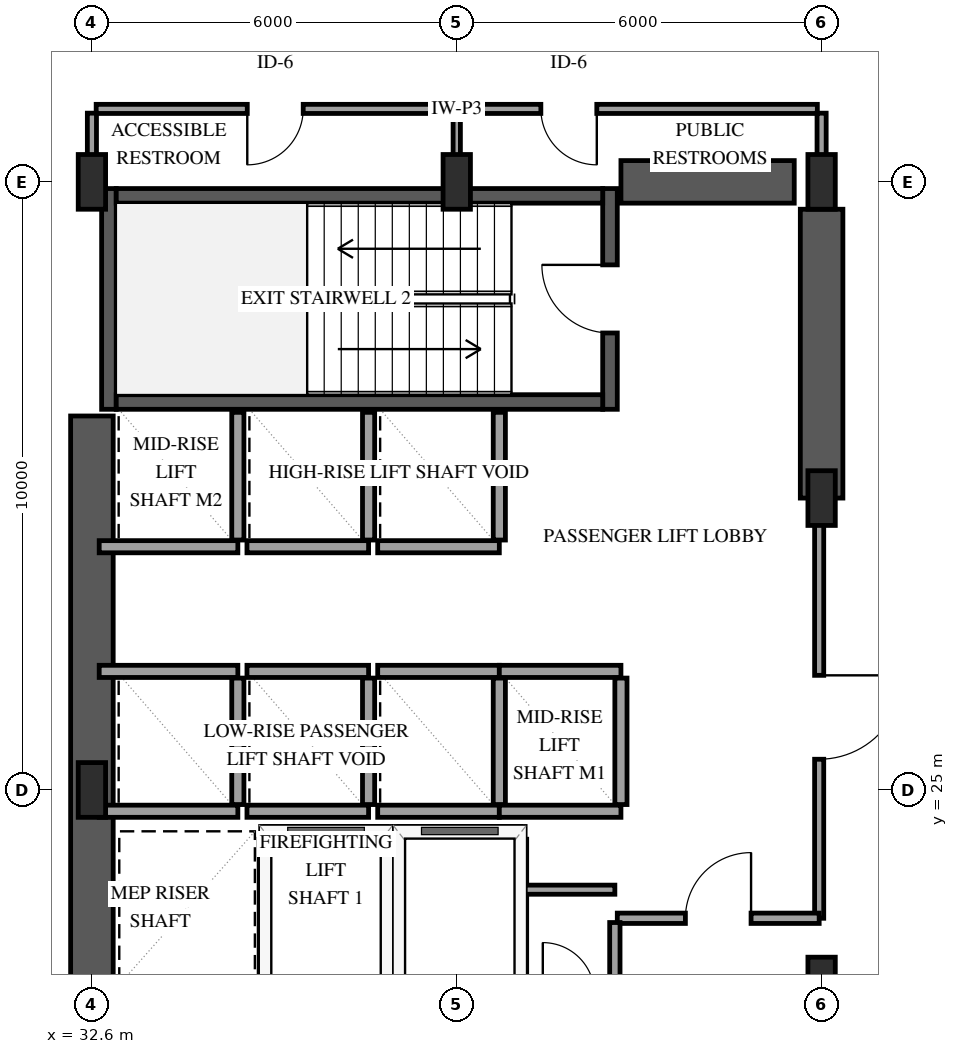
"""IFC4 building model, lengths in metres.
Left out: names, types, materials, properties, quantities, classifications, styles, units other than length and angle.
Written with IfcOpenShell. Run it as: python <this file> out.ifc"""

import sys

from ifc_helpers import new_model, si_unit, direction, frame, frame_2d, origin, origin_2d, place, context, subcontext, project, spatial, rectangle, extrude, element, fill, save


model = new_model("IFC4")
c1 = context("Model", 3, precision=1e-05, world=origin(), true_north=direction((0.0, 1.0)))
c2 = subcontext(c1, "Body", "Model", "MODEL_VIEW")
j1 = project(units=[si_unit("LENGTHUNIT", "METRE"), si_unit("PLANEANGLEUNIT", "RADIAN")], contexts=[c1])
p1 = place(None, origin())
s1 = spatial("IfcSite", under=j1, at=p1, CompositionType="ELEMENT")
p2 = place(p1, origin())
s2 = spatial("IfcBuilding", under=s1, at=p2, CompositionType="ELEMENT")
p3 = place(p2, frame((0.0, 0.0, 20.7)))
s3 = spatial("IfcBuildingStorey", under=s2, at=p3, CompositionType="ELEMENT", Elevation=20.7)
p4 = place(p3, frame((32.88, 31.26, 0.0), z_axis=(0.0, 0.0, 1.0), x_axis=(0.0, 1.0, 0.0)))
e1 = element("IfcWall", 1, at=p4, inside=s3, PredefinedType="SHEAR", context=c2, shape_type="SweptSolid", body=[
    extrude(rectangle(XDim=3.63, YDim=0.24, at=frame_2d((1.815, 0.0))), origin(), (0.0, 0.0, 1.0), 4.5),
])
p5 = place(p3, frame((41.12, 31.26, 0.0), z_axis=(0.0, 0.0, 1.0), x_axis=(0.0, 1.0, 0.0)))
e2 = element("IfcWall", 2, at=p5, inside=s3, PredefinedType="SHEAR", context=c2, shape_type="SweptSolid", body=[
    extrude(rectangle(XDim=3.63, YDim=0.24, at=frame_2d((1.815, 0.0))), origin(), (0.0, 0.0, 1.0), 4.5),
])
p6 = place(p5, frame((1.255, 0.0, 0.0)))
e3 = element("IfcOpeningElement", 3, at=p6, cuts=e2, PredefinedType="OPENING", context=c2, shape_type="SweptSolid", body=[
    extrude(rectangle(XDim=1.12, YDim=2.15, at=frame_2d((0.56, 1.075))), frame((0.0, 0.13, 0.0), z_axis=(0.0, -1.0, 0.0), x_axis=(1.0, 0.0, 0.0)), (0.0, 0.0, 1.0), 0.26),
])
for number, where, z_axis, x_axis in (
    (4, (33.0, 31.38, 0.0), (0.0, 0.0, 1.0), (1.0, 0.0, 0.0)),
    (5, (33.0, 34.77, 0.0), (0.0, 0.0, 1.0), (1.0, 0.0, 0.0)),
):
    element("IfcWall", number, at=place(p3, frame(where, z_axis=z_axis, x_axis=x_axis)), inside=s3, PredefinedType="SHEAR", context=c2, shape_type="SweptSolid", body=[
        extrude(rectangle(XDim=8.0, YDim=0.24, at=frame_2d((4.0, 0.0))), origin(), (0.0, 0.0, 1.0), 4.5),
    ])
p7 = place(p3, frame((32.6, 18.85, 0.0), z_axis=(0.0, 0.0, 1.0), x_axis=(0.0, 1.0, 0.0)))
e6 = element("IfcWall", 6, at=p7, inside=s3, PredefinedType="SHEAR", context=c2, shape_type="SweptSolid", body=[
    extrude(rectangle(XDim=12.3, YDim=0.7, at=frame_2d((6.15, 0.0))), origin(), (0.0, 0.0, 1.0), 4.5),
])
p8 = place(p3, frame((41.3, 35.0, 0.0), z_axis=(0.0, 0.0, 1.0), x_axis=(1.0, 0.0, 0.0)))
e7 = element("IfcWall", 7, at=p8, inside=s3, PredefinedType="SHEAR", context=c2, shape_type="SweptSolid", body=[
    extrude(rectangle(XDim=2.85, YDim=0.7, at=frame_2d((1.425, 0.0))), origin(), (0.0, 0.0, 1.0), 4.5),
])
p9 = place(p3, frame((44.6, 29.8, 0.0), z_axis=(0.0, 0.0, 1.0), x_axis=(0.0, 1.0, 0.0)))
e8 = element("IfcWall", 8, at=p9, inside=s3, PredefinedType="SHEAR", context=c2, shape_type="SweptSolid", body=[
    extrude(rectangle(XDim=4.75, YDim=0.7, at=frame_2d((2.375, 0.0))), origin(), (0.0, 0.0, 1.0), 4.5),
])
for number, where, z_axis, x_axis in (
    (9, (32.6, 25.0, 0.0), (0.0, 0.0, 1.0), (1.0, 0.0, 0.0)),
    (10, (32.6, 35.0, 0.0), (0.0, 0.0, 1.0), (1.0, 0.0, 0.0)),
    (11, (38.6, 35.0, 0.0), (0.0, 0.0, 1.0), (1.0, 0.0, 0.0)),
    (12, (44.6, 21.8, 0.0), (0.0, 0.0, 1.0), (1.0, 0.0, 0.0)),
    (13, (44.6, 29.8, 0.0), (0.0, 0.0, 1.0), (1.0, 0.0, 0.0)),
    (14, (44.6, 35.0, 0.0), (0.0, 0.0, 1.0), (1.0, 0.0, 0.0)),
):
    element("IfcColumn", number, at=place(p3, frame(where, z_axis=z_axis, x_axis=x_axis)), inside=s3, PredefinedType="PILASTER", context=c2, shape_type="SweptSolid", body=[
        extrude(rectangle(XDim=0.45, YDim=0.9, at=origin_2d()), origin(), (0.0, 0.0, 1.0), 4.5),
    ])
p10 = place(p3, frame((35.45, 24.3, 0.0), z_axis=(0.0, 0.0, 1.0), x_axis=(1.0, 0.0, 0.0)))
e15 = element("IfcWall", 15, at=p10, inside=s3, PredefinedType="SOLIDWALL", context=c2, shape_type="SweptSolid", body=[
    extrude(rectangle(XDim=2.0, YDim=0.2, at=frame_2d((1.0, 0.0))), origin(), (0.0, 0.0, 1.0), 4.18),
])
for number, where, z_axis, x_axis in (
    (16, (35.45, 21.81, 0.0), (0.0, 0.0, 1.0), (0.0, 1.0, 0.0)),
    (17, (37.45, 21.81, 0.0), (0.0, 0.0, 1.0), (0.0, 1.0, 0.0)),
):
    element("IfcWall", number, at=place(p3, frame(where, z_axis=z_axis, x_axis=x_axis)), inside=s3, PredefinedType="SOLIDWALL", context=c2, shape_type="SweptSolid", body=[
        extrude(rectangle(XDim=2.38, YDim=0.2, at=frame_2d((1.19, 0.0))), origin(), (0.0, 0.0, 1.0), 4.18),
    ])
p11 = place(p3, frame((37.65, 24.3, 0.0), z_axis=(0.0, 0.0, 1.0), x_axis=(1.0, 0.0, 0.0)))
e18 = element("IfcWall", 18, at=p11, inside=s3, PredefinedType="SOLIDWALL", context=c2, shape_type="SweptSolid", body=[
    extrude(rectangle(XDim=2.0, YDim=0.2, at=frame_2d((1.0, 0.0))), origin(), (0.0, 0.0, 1.0), 4.18),
])
p12 = place(p3, frame((39.65, 21.81, 0.0), z_axis=(0.0, 0.0, 1.0), x_axis=(0.0, 1.0, 0.0)))
e19 = element("IfcWall", 19, at=p12, inside=s3, PredefinedType="SOLIDWALL", context=c2, shape_type="SweptSolid", body=[
    extrude(rectangle(XDim=2.38, YDim=0.2, at=frame_2d((1.19, 0.0))), origin(), (0.0, 0.0, 1.0), 4.18),
])
for number, where, z_axis, x_axis in (
    (20, (32.72, 24.65, 0.0), (0.0, 0.0, 1.0), (1.0, 0.0, 0.0)),
    (21, (32.72, 26.95, 0.0), (0.0, 0.0, 1.0), (1.0, 0.0, 0.0)),
):
    element("IfcWall", number, at=place(p3, frame(where, z_axis=z_axis, x_axis=x_axis)), inside=s3, PredefinedType="SOLIDWALL", context=c2, shape_type="SweptSolid", body=[
        extrude(rectangle(XDim=2.28, YDim=0.2, at=frame_2d((1.14, 0.0))), origin(), (0.0, 0.0, 1.0), 4.18),
    ])
p13 = place(p3, frame((35.0, 24.76, 0.0), z_axis=(0.0, 0.0, 1.0), x_axis=(0.0, 1.0, 0.0)))
e22 = element("IfcWall", 22, at=p13, inside=s3, PredefinedType="SOLIDWALL", context=c2, shape_type="SweptSolid", body=[
    extrude(rectangle(XDim=2.08, YDim=0.2, at=frame_2d((1.04, 0.0))), origin(), (0.0, 0.0, 1.0), 4.18),
])
for number, where, z_axis, x_axis in (
    (23, (35.15, 24.65, 0.0), (0.0, 0.0, 1.0), (1.0, 0.0, 0.0)),
    (24, (35.15, 26.95, 0.0), (0.0, 0.0, 1.0), (1.0, 0.0, 0.0)),
):
    element("IfcWall", number, at=place(p3, frame(where, z_axis=z_axis, x_axis=x_axis)), inside=s3, PredefinedType="SOLIDWALL", context=c2, shape_type="SweptSolid", body=[
        extrude(rectangle(XDim=2.0, YDim=0.2, at=frame_2d((1.0, 0.0))), origin(), (0.0, 0.0, 1.0), 4.18),
    ])
p14 = place(p3, frame((37.15, 24.76, 0.0), z_axis=(0.0, 0.0, 1.0), x_axis=(0.0, 1.0, 0.0)))
e25 = element("IfcWall", 25, at=p14, inside=s3, PredefinedType="SOLIDWALL", context=c2, shape_type="SweptSolid", body=[
    extrude(rectangle(XDim=2.08, YDim=0.2, at=frame_2d((1.04, 0.0))), origin(), (0.0, 0.0, 1.0), 4.18),
])
for number, where, z_axis, x_axis in (
    (26, (37.3, 24.65, 0.0), (0.0, 0.0, 1.0), (1.0, 0.0, 0.0)),
    (27, (37.3, 26.95, 0.0), (0.0, 0.0, 1.0), (1.0, 0.0, 0.0)),
):
    element("IfcWall", number, at=place(p3, frame(where, z_axis=z_axis, x_axis=x_axis)), inside=s3, PredefinedType="SOLIDWALL", context=c2, shape_type="SweptSolid", body=[
        extrude(rectangle(XDim=2.0, YDim=0.2, at=frame_2d((1.0, 0.0))), origin(), (0.0, 0.0, 1.0), 4.18),
    ])
p15 = place(p3, frame((39.3, 24.76, 0.0), z_axis=(0.0, 0.0, 1.0), x_axis=(0.0, 1.0, 0.0)))
e28 = element("IfcWall", 28, at=p15, inside=s3, PredefinedType="SOLIDWALL", context=c2, shape_type="SweptSolid", body=[
    extrude(rectangle(XDim=2.08, YDim=0.2, at=frame_2d((1.04, 0.0))), origin(), (0.0, 0.0, 1.0), 4.18),
])
for number, where, z_axis, x_axis in (
    (29, (39.3, 24.65, 0.0), (0.0, 0.0, 1.0), (1.0, 0.0, 0.0)),
    (30, (39.3, 26.95, 0.0), (0.0, 0.0, 1.0), (1.0, 0.0, 0.0)),
):
    element("IfcWall", number, at=place(p3, frame(where, z_axis=z_axis, x_axis=x_axis)), inside=s3, PredefinedType="SOLIDWALL", context=c2, shape_type="SweptSolid", body=[
        extrude(rectangle(XDim=2.0, YDim=0.2, at=frame_2d((1.0, 0.0))), origin(), (0.0, 0.0, 1.0), 4.18),
    ])
p16 = place(p3, frame((41.3, 24.76, 0.0), z_axis=(0.0, 0.0, 1.0), x_axis=(0.0, 1.0, 0.0)))
e31 = element("IfcWall", 31, at=p16, inside=s3, PredefinedType="SOLIDWALL", context=c2, shape_type="SweptSolid", body=[
    extrude(rectangle(XDim=2.08, YDim=0.2, at=frame_2d((1.04, 0.0))), origin(), (0.0, 0.0, 1.0), 4.18),
])
p17 = place(p3, frame((32.72, 29.0, 0.0), z_axis=(0.0, 0.0, 1.0), x_axis=(1.0, 0.0, 0.0)))
e32 = element("IfcWall", 32, at=p17, inside=s3, PredefinedType="SOLIDWALL", context=c2, shape_type="SweptSolid", body=[
    extrude(rectangle(XDim=2.28, YDim=0.2, at=frame_2d((1.14, 0.0))), origin(), (0.0, 0.0, 1.0), 4.18),
])
p18 = place(p3, frame((35.0, 29.11, 0.0), z_axis=(0.0, 0.0, 1.0), x_axis=(0.0, 1.0, 0.0)))
e33 = element("IfcWall", 33, at=p18, inside=s3, PredefinedType="SOLIDWALL", context=c2, shape_type="SweptSolid", body=[
    extrude(rectangle(XDim=2.1, YDim=0.2, at=frame_2d((1.05, 0.0))), origin(), (0.0, 0.0, 1.0), 4.18),
])
p19 = place(p3, frame((35.15, 29.0, 0.0), z_axis=(0.0, 0.0, 1.0), x_axis=(1.0, 0.0, 0.0)))
e34 = element("IfcWall", 34, at=p19, inside=s3, PredefinedType="SOLIDWALL", context=c2, shape_type="SweptSolid", body=[
    extrude(rectangle(XDim=2.0, YDim=0.2, at=frame_2d((1.0, 0.0))), origin(), (0.0, 0.0, 1.0), 4.18),
])
p20 = place(p3, frame((37.15, 29.11, 0.0), z_axis=(0.0, 0.0, 1.0), x_axis=(0.0, 1.0, 0.0)))
e35 = element("IfcWall", 35, at=p20, inside=s3, PredefinedType="SOLIDWALL", context=c2, shape_type="SweptSolid", body=[
    extrude(rectangle(XDim=2.1, YDim=0.2, at=frame_2d((1.05, 0.0))), origin(), (0.0, 0.0, 1.0), 4.18),
])
p21 = place(p3, frame((37.3, 29.0, 0.0), z_axis=(0.0, 0.0, 1.0), x_axis=(1.0, 0.0, 0.0)))
e36 = element("IfcWall", 36, at=p21, inside=s3, PredefinedType="SOLIDWALL", context=c2, shape_type="SweptSolid", body=[
    extrude(rectangle(XDim=2.0, YDim=0.2, at=frame_2d((1.0, 0.0))), origin(), (0.0, 0.0, 1.0), 4.18),
])
p22 = place(p3, frame((39.3, 29.11, 0.0), z_axis=(0.0, 0.0, 1.0), x_axis=(0.0, 1.0, 0.0)))
e37 = element("IfcWall", 37, at=p22, inside=s3, PredefinedType="SOLIDWALL", context=c2, shape_type="SweptSolid", body=[
    extrude(rectangle(XDim=2.1, YDim=0.2, at=frame_2d((1.05, 0.0))), origin(), (0.0, 0.0, 1.0), 4.18),
])
p23 = place(p3, frame((44.56, 29.8, 0.0), z_axis=(0.0, 0.0, 1.0), x_axis=(0.0, -1.0, 0.0)))
e38 = element("IfcWall", 38, at=p23, inside=s3, PredefinedType="PARTITIONING", context=c2, shape_type="SweptSolid", body=[
    extrude(rectangle(XDim=6.91, YDim=0.15, at=frame_2d((3.455, 0.0))), origin(), (0.0, 0.0, 1.0), 3.22),
])
p24 = place(p23, frame((2.915, 0.0, 0.0)))
e39 = element("IfcOpeningElement", 39, at=p24, cuts=e38, PredefinedType="OPENING", context=c2, shape_type="SweptSolid", body=[
    extrude(rectangle(XDim=1.38, YDim=2.2, at=frame_2d((0.69, 1.1))), frame((0.0, 0.085, 0.0), z_axis=(0.0, -1.0, 0.0), x_axis=(1.0, 0.0, 0.0)), (0.0, 0.0, 1.0), 0.17),
])
p25 = place(p3, frame((38.53, 36.2, 0.0), z_axis=(0.0, 0.0, 1.0), x_axis=(-1.0, 0.0, 0.0)))
e40 = element("IfcWall", 40, at=p25, inside=s3, PredefinedType="PARTITIONING", context=c2, shape_type="SweptSolid", body=[
    extrude(rectangle(XDim=5.86, YDim=0.15, at=frame_2d((2.93, 0.0))), origin(), (0.0, 0.0, 1.0), 4.18),
])
p26 = place(p25, frame((2.455, 0.0, 0.0)))
e41 = element("IfcOpeningElement", 41, at=p26, cuts=e40, PredefinedType="OPENING", context=c2, shape_type="SweptSolid", body=[
    extrude(rectangle(XDim=0.92, YDim=2.12, at=frame_2d((0.46, 1.06))), frame((0.0, 0.085, 0.0), z_axis=(0.0, -1.0, 0.0), x_axis=(1.0, 0.0, 0.0)), (0.0, 0.0, 1.0), 0.17),
])
p27 = place(p3, frame((44.53, 36.2, 0.0), z_axis=(0.0, 0.0, 1.0), x_axis=(-1.0, 0.0, 0.0)))
e42 = element("IfcWall", 42, at=p27, inside=s3, PredefinedType="PARTITIONING", context=c2, shape_type="SweptSolid", body=[
    extrude(rectangle(XDim=5.86, YDim=0.15, at=frame_2d((2.93, 0.0))), origin(), (0.0, 0.0, 1.0), 4.18),
])
p28 = place(p27, frame((3.627, 0.0, 0.0)))
e43 = element("IfcOpeningElement", 43, at=p28, cuts=e42, PredefinedType="OPENING", context=c2, shape_type="SweptSolid", body=[
    extrude(rectangle(XDim=0.92, YDim=2.12, at=frame_2d((0.46, 1.06))), frame((0.0, 0.085, 0.0), z_axis=(0.0, -1.0, 0.0), x_axis=(1.0, 0.0, 0.0)), (0.0, 0.0, 1.0), 0.17),
])
p29 = place(p3, frame((41.24, 22.89, 0.0), z_axis=(0.0, 0.0, 1.0), x_axis=(1.0, 0.0, 0.0)))
e44 = element("IfcWall", 44, at=p29, inside=s3, PredefinedType="PARTITIONING", context=c2, shape_type="SweptSolid", body=[
    extrude(rectangle(XDim=3.32, YDim=0.17, at=frame_2d((1.66, 0.0))), origin(), (0.0, 0.0, 1.0), 4.18),
])
p30 = place(p29, frame((1.12, 0.0, 0.0)))
e45 = element("IfcOpeningElement", 45, at=p30, cuts=e44, PredefinedType="OPENING", context=c2, shape_type="SweptSolid", body=[
    extrude(rectangle(XDim=1.08, YDim=2.15, at=frame_2d((0.54, 1.075))), frame((0.0, 0.095, 0.0), z_axis=(0.0, -1.0, 0.0), x_axis=(1.0, 0.0, 0.0)), (0.0, 0.0, 1.0), 0.19),
])
p31 = place(p3, frame((41.2, 21.7, 0.0), z_axis=(0.0, 0.0, 1.0), x_axis=(0.0, 1.0, 0.0)))
e46 = element("IfcWall", 46, at=p31, inside=s3, PredefinedType="PARTITIONING", context=c2, shape_type="SweptSolid", body=[
    extrude(rectangle(XDim=1.12, YDim=0.17, at=frame_2d((0.56, 0.0))), origin(), (0.0, 0.0, 1.0), 4.18),
])
for number, where, z_axis, x_axis in (
    (47, (32.6, 36.13, 0.0), (0.0, 0.0, 1.0), (0.0, -1.0, 0.0)),
    (48, (44.6, 35.07, 0.0), (0.0, 0.0, 1.0), (0.0, 1.0, 0.0)),
):
    element("IfcWall", number, at=place(p3, frame(where, z_axis=z_axis, x_axis=x_axis)), inside=s3, PredefinedType="PARTITIONING", context=c2, shape_type="SweptSolid", body=[
        extrude(rectangle(XDim=1.06, YDim=0.15, at=frame_2d((0.53, 0.0))), origin(), (0.0, 0.0, 1.0), 3.302),
    ])
p32 = place(p3, frame((38.6, 36.13, 0.0), z_axis=(0.0, 0.0, 1.0), x_axis=(0.0, -1.0, 0.0)))
e49 = element("IfcWall", 49, at=p32, inside=s3, PredefinedType="PARTITIONING", context=c2, shape_type="SweptSolid", body=[
    extrude(rectangle(XDim=1.06, YDim=0.12, at=frame_2d((0.53, 0.0))), origin(), (0.0, 0.0, 1.0), 4.18),
])
p33 = place(p3, frame((41.2, 23.36, 0.0), z_axis=(0.0, 0.0, 1.0), x_axis=(-1.0, 0.0, 0.0)))
e50 = element("IfcWall", 50, at=p33, inside=s3, PredefinedType="PARTITIONING", context=c2, shape_type="SweptSolid", body=[
    extrude(rectangle(XDim=1.48, YDim=0.15, at=frame_2d((0.74, 0.0))), origin(), (0.0, 0.0, 1.0), 4.18),
])
p34 = place(p6, origin())
e51 = element("IfcDoor", 51, at=p34, inside=s3, OperationType="SINGLE_SWING_RIGHT", PredefinedType="DOOR", context=c2, shape_type="SweptSolid", body=[
    extrude(rectangle(XDim=1.12, YDim=2.15, at=frame_2d((0.56, 1.075))), frame((0.0, 0.025, 0.0), z_axis=(0.0, -1.0, 0.0), x_axis=(1.0, 0.0, 0.0)), (0.0, 0.0, 1.0), 0.05),
])
fill(e3, e51)
p35 = place(p24, origin())
e52 = element("IfcDoor", 52, at=p35, inside=s3, OperationType="SINGLE_SWING_LEFT", PredefinedType="DOOR", context=c2, shape_type="SweptSolid", body=[
    extrude(rectangle(XDim=1.38, YDim=2.2, at=frame_2d((0.69, 1.1))), frame((0.0, 0.025, 0.0), z_axis=(0.0, -1.0, 0.0), x_axis=(1.0, 0.0, 0.0)), (0.0, 0.0, 1.0), 0.05),
])
fill(e39, e52)
p36 = place(p26, origin())
e53 = element("IfcDoor", 53, at=p36, inside=s3, OperationType="SINGLE_SWING_RIGHT", PredefinedType="DOOR", context=c2, shape_type="SweptSolid", body=[
    extrude(rectangle(XDim=0.92, YDim=2.12, at=frame_2d((0.46, 1.06))), frame((0.0, 0.025, 0.0), z_axis=(0.0, -1.0, 0.0), x_axis=(1.0, 0.0, 0.0)), (0.0, 0.0, 1.0), 0.05),
])
fill(e41, e53)
p37 = place(p28, origin())
e54 = element("IfcDoor", 54, at=p37, inside=s3, OperationType="SINGLE_SWING_LEFT", PredefinedType="DOOR", context=c2, shape_type="SweptSolid", body=[
    extrude(rectangle(XDim=0.92, YDim=2.12, at=frame_2d((0.46, 1.06))), frame((0.0, 0.025, 0.0), z_axis=(0.0, -1.0, 0.0), x_axis=(1.0, 0.0, 0.0)), (0.0, 0.0, 1.0), 0.05),
])
fill(e43, e54)
p38 = place(p30, origin())
e55 = element("IfcDoor", 55, at=p38, inside=s3, OperationType="SINGLE_SWING_RIGHT", PredefinedType="DOOR", context=c2, shape_type="SweptSolid", body=[
    extrude(rectangle(XDim=1.08, YDim=2.15, at=frame_2d((0.54, 1.075))), frame((0.0, 0.025, 0.0), z_axis=(0.0, -1.0, 0.0), x_axis=(1.0, 0.0, 0.0)), (0.0, 0.0, 1.0), 0.05),
])
fill(e45, e55)
save(model, sys.argv[1])
